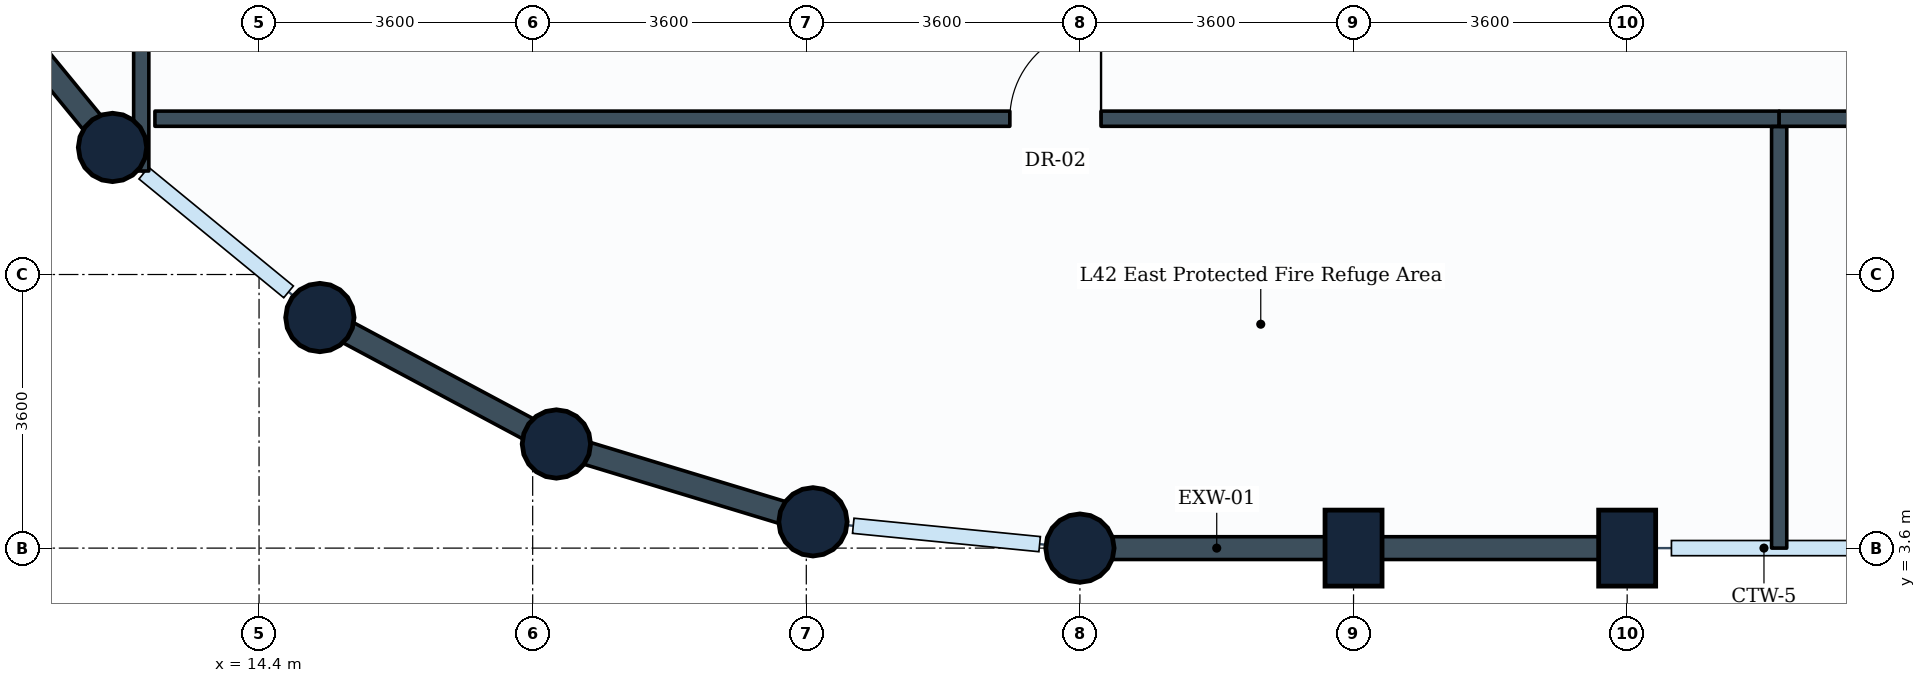
"""IFC4 building model, lengths in metres.
Left out: names, types, materials, properties, quantities, classifications, styles, units other than length and angle.
Written with IfcOpenShell. Run it as: python <this file> out.ifc"""

import sys

from ifc_helpers import new_model, si_unit, direction, frame, frame_2d, origin, origin_2d, place, context, subcontext, project, spatial, rectangle, circle, extrude, element, fill, save


model = new_model("IFC4")
c1 = context("Model", 3, precision=1e-05, world=origin(), true_north=direction((0.0, 1.0)))
c2 = subcontext(c1, "Body", "Model", "MODEL_VIEW")
j1 = project(units=[si_unit("LENGTHUNIT", "METRE"), si_unit("PLANEANGLEUNIT", "RADIAN")], contexts=[c1])
p1 = place(None, origin())
s1 = spatial("IfcSite", under=j1, at=p1, CompositionType="ELEMENT")
p2 = place(p1, origin())
s2 = spatial("IfcBuilding", under=s1, at=p2, CompositionType="ELEMENT")
p3 = place(p2, frame((0.0, 0.0, 169.4)))
s3 = spatial("IfcBuildingStorey", under=s2, at=p3, CompositionType="ELEMENT", Elevation=169.4)
for number, where, z_axis, x_axis in (
    (1, (12.472, 8.872, 0.0), (0.0, 0.0, 1.0), (1.0, 0.0, 0.0)),
    (2, (15.2, 6.634, 0.0), (0.0, 0.0, 1.0), (1.0, 0.0, 0.0)),
    (3, (18.312, 4.97, 0.0), (0.0, 0.0, 1.0), (1.0, 0.0, 0.0)),
    (4, (21.688, 3.946, 0.0), (0.0, 0.0, 1.0), (1.0, 0.0, 0.0)),
    (5, (25.2, 3.6, 0.0), (0.0, 0.0, 1.0), (1.0, 0.0, 0.0)),
):
    element("IfcColumn", number, at=place(p3, frame(where, z_axis=z_axis, x_axis=x_axis)), inside=s3, PredefinedType="COLUMN", context=c2, shape_type="SweptSolid", body=[
        extrude(circle(Radius=0.45, at=origin_2d()), origin(), (0.0, 0.0, 1.0), 5.4),
    ])
for number, where, z_axis, x_axis in (
    (6, (28.8, 3.6, 0.0), (0.0, 0.0, 1.0), (1.0, 0.0, 0.0)),
    (7, (32.4, 3.6, 0.0), (0.0, 0.0, 1.0), (1.0, 0.0, 0.0)),
):
    element("IfcColumn", number, at=place(p3, frame(where, z_axis=z_axis, x_axis=x_axis)), inside=s3, PredefinedType="COLUMN", context=c2, shape_type="SweptSolid", body=[
        extrude(rectangle(XDim=0.75, YDim=1.0, at=origin_2d()), origin(), (0.0, 0.0, 1.0), 5.4),
    ])
p4 = place(p3, frame((28.8, 3.6, 0.0), z_axis=(0.0, 0.0, 1.0), x_axis=(-1.0, 0.0, 0.0)))
e8 = element("IfcWall", 8, at=p4, inside=s3, PredefinedType="STANDARD", context=c2, shape_type="SweptSolid", body=[
    extrude(rectangle(XDim=3.6, YDim=0.3, at=frame_2d((1.8, 0.0))), origin(), (0.0, 0.0, 1.0), 4.53),
])
p5 = place(p3, frame((32.4, 3.6, 0.0), z_axis=(0.0, 0.0, 1.0), x_axis=(-1.0, 0.0, 0.0)))
e9 = element("IfcWall", 9, at=p5, inside=s3, PredefinedType="STANDARD", context=c2, shape_type="SweptSolid", body=[
    extrude(rectangle(XDim=3.6, YDim=0.3, at=frame_2d((1.8, 0.0))), origin(), (0.0, 0.0, 1.0), 4.53),
])
p6 = place(p3, frame((12.472, 8.872, 0.0), z_axis=(0.0, 0.0, 1.0), x_axis=(-0.634258295121, 0.773121216285, 0.0)))
e10 = element("IfcWall", 10, at=p6, inside=s3, PredefinedType="STANDARD", context=c2, shape_type="SweptSolid", body=[
    extrude(rectangle(XDim=3.529, YDim=0.3, at=frame_2d((1.764, 0.0))), origin(), (0.0, 0.0, 1.0), 4.53),
])
p7 = place(p3, frame((18.312, 4.97, 0.0), z_axis=(0.0, 0.0, 1.0), x_axis=(-0.881846862014, 0.471535907389, 0.0)))
e11 = element("IfcWall", 11, at=p7, inside=s3, PredefinedType="STANDARD", context=c2, shape_type="SweptSolid", body=[
    extrude(rectangle(XDim=3.529, YDim=0.3, at=frame_2d((1.765, 0.0))), origin(), (0.0, 0.0, 1.0), 4.53),
])
p8 = place(p3, frame((21.688, 3.946, 0.0), z_axis=(0.0, 0.0, 1.0), x_axis=(-0.956953367403, 0.290241714123, 0.0)))
e12 = element("IfcWall", 12, at=p8, inside=s3, PredefinedType="STANDARD", context=c2, shape_type="SweptSolid", body=[
    extrude(rectangle(XDim=3.528, YDim=0.3, at=frame_2d((1.764, 0.0))), origin(), (0.0, 0.0, 1.0), 4.53),
])
p9 = place(p3, frame((12.85, 8.562, 0.0), z_axis=(0.0, 0.0, 1.0), x_axis=(0.0, 1.0, 0.0)))
e13 = element("IfcWall", 13, at=p9, inside=s3, PredefinedType="PARTITIONING", context=c2, shape_type="SweptSolid", body=[
    extrude(rectangle(XDim=16.638, YDim=0.2, at=frame_2d((8.319, 0.0))), origin(), (0.0, 0.0, 1.0), 4.53),
])
p10 = place(p9, frame((7.719, 0.0, 0.0)))
e14 = element("IfcOpeningElement", 14, at=p10, cuts=e13, PredefinedType="OPENING", context=c2, shape_type="SweptSolid", body=[
    extrude(rectangle(XDim=1.2, YDim=2.1, at=frame_2d((0.6, 1.05))), frame((0.0, 0.11, 0.0), z_axis=(0.0, -1.0, 0.0), x_axis=(1.0, 0.0, 0.0)), (0.0, 0.0, 1.0), 0.22),
])
p11 = place(p3, frame((13.03, 9.25, 0.0), z_axis=(0.0, 0.0, 1.0), x_axis=(1.0, 0.0, 0.0)))
e15 = element("IfcWall", 15, at=p11, inside=s3, PredefinedType="PARTITIONING", context=c2, shape_type="SweptSolid", body=[
    extrude(rectangle(XDim=21.37, YDim=0.2, at=frame_2d((10.685, 0.0))), origin(), (0.0, 0.0, 1.0), 4.7),
])
p12 = place(p11, frame((11.248, 0.0, 0.0)))
e16 = element("IfcOpeningElement", 16, at=p12, cuts=e15, PredefinedType="OPENING", context=c2, shape_type="SweptSolid", body=[
    extrude(rectangle(XDim=1.2, YDim=2.1, at=frame_2d((0.6, 1.05))), frame((0.0, 0.11, 0.0), z_axis=(0.0, -1.0, 0.0), x_axis=(1.0, 0.0, 0.0)), (0.0, 0.0, 1.0), 0.22),
])
p13 = place(p3, frame((34.4, 3.6, 0.0), z_axis=(0.0, 0.0, 1.0), x_axis=(0.0, 1.0, 0.0)))
e17 = element("IfcWall", 17, at=p13, inside=s3, PredefinedType="PARTITIONING", context=c2, shape_type="SweptSolid", body=[
    extrude(rectangle(XDim=5.546, YDim=0.2, at=frame_2d((2.773, 0.0))), origin(), (0.0, 0.0, 1.0), 4.53),
])
p14 = place(p3, frame((34.4, 9.25, 0.0), z_axis=(0.0, 0.0, 1.0), x_axis=(1.0, 0.0, 0.0)))
e18 = element("IfcWall", 18, at=p14, inside=s3, PredefinedType="PARTITIONING", context=c2, shape_type="SweptSolid", body=[
    extrude(rectangle(XDim=9.35, YDim=0.2, at=frame_2d((4.675, 0.0))), origin(), (0.0, 0.0, 1.0), 4.7),
])
p15 = place(p14, frame((3.735, 0.0, 0.0)))
e19 = element("IfcOpeningElement", 19, at=p15, cuts=e18, PredefinedType="OPENING", context=c2, shape_type="SweptSolid", body=[
    extrude(rectangle(XDim=1.8, YDim=2.2, at=frame_2d((0.9, 1.1))), frame((0.0, 0.11, 0.0), z_axis=(0.0, -1.0, 0.0), x_axis=(1.0, 0.0, 0.0)), (0.0, 0.0, 1.0), 0.22),
])
p16 = place(p12, origin())
e20 = element("IfcDoor", 20, at=p16, inside=s3, OperationType="SINGLE_SWING_RIGHT", PredefinedType="DOOR", context=c2, shape_type="SweptSolid", body=[
    extrude(rectangle(XDim=1.2, YDim=2.1, at=frame_2d((0.6, 1.05))), frame((0.0, 0.025, 0.0), z_axis=(0.0, -1.0, 0.0), x_axis=(1.0, 0.0, 0.0)), (0.0, 0.0, 1.0), 0.05),
])
fill(e16, e20)
save(model, sys.argv[1])
